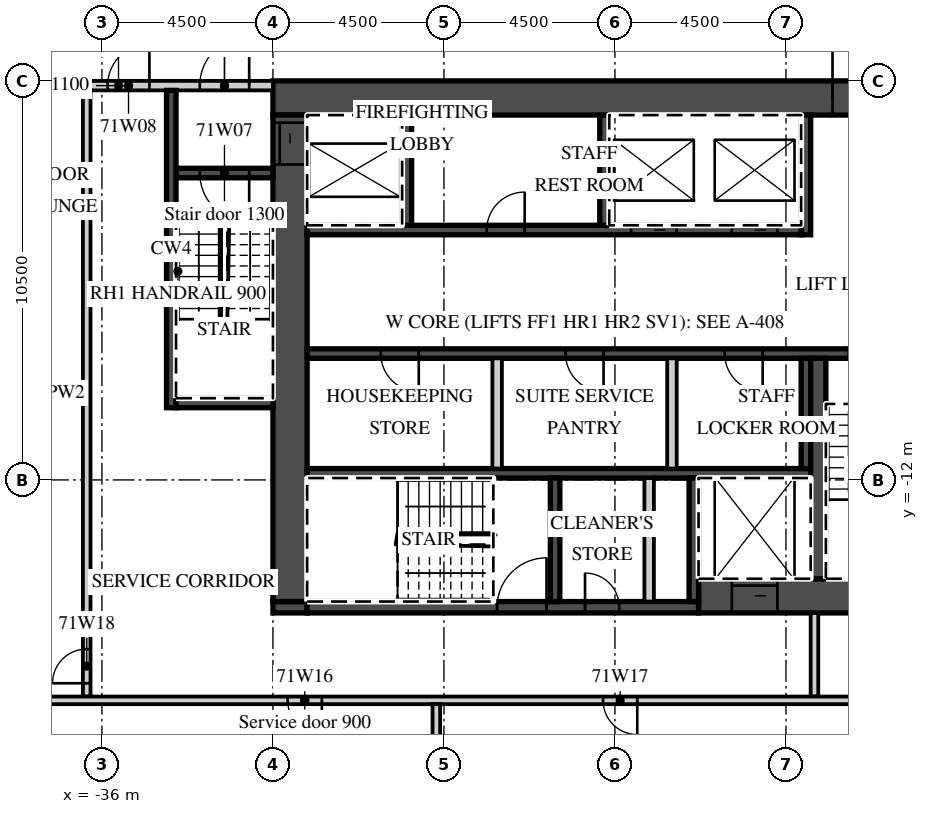
"""IFC4 building model, lengths in metres.
Left out: names, types, materials, properties, quantities, classifications, styles, units other than length and angle.
Written with IfcOpenShell. Run it as: python <this file> out.ifc"""

import sys

from ifc_helpers import new_model, si_unit, direction, frame, frame_2d, origin, place, context, subcontext, project, spatial, rectangle, extrude, element, fill, save


model = new_model("IFC4")
c1 = context("Model", 3, precision=1e-05, world=origin(), true_north=direction((0.0, 1.0)))
c2 = subcontext(c1, "Body", "Model", "MODEL_VIEW")
j1 = project(units=[si_unit("LENGTHUNIT", "METRE"), si_unit("PLANEANGLEUNIT", "RADIAN")], contexts=[c1])
p1 = place(None, origin())
s1 = spatial("IfcSite", under=j1, at=p1, CompositionType="ELEMENT")
p2 = place(p1, origin())
s2 = spatial("IfcBuilding", under=s1, at=p2, CompositionType="ELEMENT")
p3 = place(p2, frame((0.0, 0.0, 285.0)))
s3 = spatial("IfcBuildingStorey", under=s2, at=p3, CompositionType="ELEMENT", Elevation=285.0)
p4 = place(p3, frame((-31.5, -1.95, 0.0), z_axis=(0.0, 0.0, 1.0), x_axis=(1.0, 0.0, 0.0)))
e1 = element("IfcWall", 1, at=p4, inside=s3, PredefinedType="SHEAR", context=c2, shape_type="SweptSolid", body=[
    extrude(rectangle(XDim=18.0, YDim=0.9, at=frame_2d((9.0, 0.0))), origin(), (0.0, 0.0, 1.0), 3.02),
])
p5 = place(p4, frame((14.725, 0.0, 0.0)))
e2 = element("IfcOpeningElement", 2, at=p5, cuts=e1, PredefinedType="OPENING", context=c2, shape_type="SweptSolid", body=[
    extrude(rectangle(XDim=1.8, YDim=2.1, at=frame_2d((0.9, 1.05))), frame((0.0, 0.46, 0.0), z_axis=(0.0, -1.0, 0.0), x_axis=(1.0, 0.0, 0.0)), (0.0, 0.0, 1.0), 0.92),
])
p6 = place(p3, frame((-20.3, -15.05, 0.0), z_axis=(0.0, 0.0, 1.0), x_axis=(1.0, 0.0, 0.0)))
e3 = element("IfcWall", 3, at=p6, inside=s3, PredefinedType="SHEAR", context=c2, shape_type="SweptSolid", body=[
    extrude(rectangle(XDim=6.8, YDim=0.9, at=frame_2d((3.4, 0.0))), origin(), (0.0, 0.0, 1.0), 3.02),
])
p7 = place(p6, frame((0.875, 0.0, 0.0)))
e4 = element("IfcOpeningElement", 4, at=p7, cuts=e3, PredefinedType="OPENING", context=c2, shape_type="SweptSolid", body=[
    extrude(rectangle(XDim=1.2, YDim=2.1, at=frame_2d((0.6, 1.05))), frame((0.0, 0.46, 0.0), z_axis=(0.0, -1.0, 0.0), x_axis=(1.0, 0.0, 0.0)), (0.0, 0.0, 1.0), 0.92),
])
p8 = place(p3, frame((-31.5, -15.35, 0.0), z_axis=(0.0, 0.0, 1.0), x_axis=(1.0, 0.0, 0.0)))
e5 = element("IfcWall", 5, at=p8, inside=s3, PredefinedType="SHEAR", context=c2, shape_type="SweptSolid", body=[
    extrude(rectangle(XDim=0.9, YDim=0.3, at=frame_2d((0.45, 0.0))), origin(), (0.0, 0.0, 1.0), 3.02),
])
p9 = place(p3, frame((-30.6, -15.35, 0.0), z_axis=(0.0, 0.0, 1.0), x_axis=(1.0, 0.0, 0.0)))
e6 = element("IfcWall", 6, at=p9, inside=s3, PredefinedType="SHEAR", context=c2, shape_type="SweptSolid", body=[
    extrude(rectangle(XDim=10.3, YDim=0.3, at=frame_2d((5.15, 0.0))), origin(), (0.0, 0.0, 1.0), 3.02),
])
p10 = place(p9, frame((5.0, 0.0, 0.0)))
e7 = element("IfcOpeningElement", 7, at=p10, cuts=e6, PredefinedType="OPENING", context=c2, shape_type="SweptSolid", body=[
    extrude(rectangle(XDim=1.3, YDim=2.1, at=frame_2d((0.65, 1.05))), frame((0.0, 0.16, 0.0), z_axis=(0.0, -1.0, 0.0), x_axis=(1.0, 0.0, 0.0)), (0.0, 0.0, 1.0), 0.32),
])
p11 = place(p9, frame((7.312, 0.0, 0.0)))
e8 = element("IfcOpeningElement", 8, at=p11, cuts=e6, PredefinedType="OPENING", context=c2, shape_type="SweptSolid", body=[
    extrude(rectangle(XDim=0.9, YDim=2.1, at=frame_2d((0.45, 1.05))), frame((0.0, 0.16, 0.0), z_axis=(0.0, -1.0, 0.0), x_axis=(1.0, 0.0, 0.0)), (0.0, 0.0, 1.0), 0.32),
])
p12 = place(p3, frame((-31.05, -15.2, 0.0), z_axis=(0.0, 0.0, 1.0), x_axis=(0.0, 1.0, 0.0)))
e9 = element("IfcWall", 9, at=p12, inside=s3, PredefinedType="SHEAR", context=c2, shape_type="SweptSolid", body=[
    extrude(rectangle(XDim=12.8, YDim=0.9, at=frame_2d((6.4, 0.0))), origin(), (0.0, 0.0, 1.0), 3.02),
])
p13 = place(p12, frame((11.5, 0.0, 0.0)))
e10 = element("IfcOpeningElement", 10, at=p13, cuts=e9, PredefinedType="OPENING", context=c2, shape_type="SweptSolid", body=[
    extrude(rectangle(XDim=1.1, YDim=2.1, at=frame_2d((0.55, 1.05))), frame((0.0, 0.46, 0.0), z_axis=(0.0, -1.0, 0.0), x_axis=(1.0, 0.0, 0.0)), (0.0, 0.0, 1.0), 0.92),
])
p14 = place(p3, frame((-30.6, -5.425, 0.0), z_axis=(0.0, 0.0, 1.0), x_axis=(1.0, 0.0, 0.0)))
e11 = element("IfcWall", 11, at=p14, inside=s3, PredefinedType="SHEAR", context=c2, shape_type="SweptSolid", body=[
    extrude(rectangle(XDim=13.0, YDim=0.25, at=frame_2d((6.5, 0.0))), origin(), (0.0, 0.0, 1.0), 3.02),
])
p15 = place(p14, frame((8.525, 0.0, 0.0)))
e12 = element("IfcOpeningElement", 12, at=p15, cuts=e11, PredefinedType="OPENING", context=c2, shape_type="SweptSolid", body=[
    extrude(rectangle(XDim=1.2, YDim=2.1, at=frame_2d((0.6, 1.05))), frame((0.0, 0.135, 0.0), z_axis=(0.0, -1.0, 0.0), x_axis=(1.0, 0.0, 0.0)), (0.0, 0.0, 1.0), 0.27),
])
p16 = place(p14, frame((11.175, 0.0, 0.0)))
e13 = element("IfcOpeningElement", 13, at=p16, cuts=e11, PredefinedType="OPENING", context=c2, shape_type="SweptSolid", body=[
    extrude(rectangle(XDim=1.2, YDim=2.1, at=frame_2d((0.6, 1.05))), frame((0.0, 0.135, 0.0), z_axis=(0.0, -1.0, 0.0), x_axis=(1.0, 0.0, 0.0)), (0.0, 0.0, 1.0), 0.27),
])
p17 = place(p14, frame((4.725, 0.0, 0.0)))
e14 = element("IfcOpeningElement", 14, at=p17, cuts=e11, PredefinedType="OPENING", context=c2, shape_type="SweptSolid", body=[
    extrude(rectangle(XDim=1.0, YDim=2.1, at=frame_2d((0.5, 1.05))), frame((0.0, 0.135, 0.0), z_axis=(0.0, -1.0, 0.0), x_axis=(1.0, 0.0, 0.0)), (0.0, 0.0, 1.0), 0.27),
])
p18 = place(p3, frame((-17.475, -5.55, 0.0), z_axis=(0.0, 0.0, 1.0), x_axis=(0.0, 1.0, 0.0)))
e15 = element("IfcWall", 15, at=p18, inside=s3, PredefinedType="SHEAR", context=c2, shape_type="SweptSolid", body=[
    extrude(rectangle(XDim=3.15, YDim=0.25, at=frame_2d((1.575, 0.0))), origin(), (0.0, 0.0, 1.0), 3.02),
])
for number, where, z_axis, x_axis in (
    (16, (-27.975, -5.3, 0.0), (0.0, 0.0, 1.0), (0.0, 1.0, 0.0)),
    (17, (-22.775, -5.3, 0.0), (0.0, 0.0, 1.0), (0.0, 1.0, 0.0)),
):
    element("IfcWall", number, at=place(p3, frame(where, z_axis=z_axis, x_axis=x_axis)), inside=s3, PredefinedType="SHEAR", context=c2, shape_type="SweptSolid", body=[
        extrude(rectangle(XDim=2.9, YDim=0.25, at=frame_2d((1.45, 0.0))), origin(), (0.0, 0.0, 1.0), 3.02),
    ])
p19 = place(p3, frame((-30.6, -8.675, 0.0), z_axis=(0.0, 0.0, 1.0), x_axis=(1.0, 0.0, 0.0)))
e18 = element("IfcWall", 18, at=p19, inside=s3, PredefinedType="SHEAR", context=c2, shape_type="SweptSolid", body=[
    extrude(rectangle(XDim=16.2, YDim=0.25, at=frame_2d((8.1, 0.0))), origin(), (0.0, 0.0, 1.0), 3.02),
])
p20 = place(p19, frame((14.25, 0.0, 0.0)))
e19 = element("IfcOpeningElement", 19, at=p20, cuts=e18, PredefinedType="OPENING", context=c2, shape_type="SweptSolid", body=[
    extrude(rectangle(XDim=1.3, YDim=2.1, at=frame_2d((0.65, 1.05))), frame((0.0, 0.135, 0.0), z_axis=(0.0, -1.0, 0.0), x_axis=(1.0, 0.0, 0.0)), (0.0, 0.0, 1.0), 0.27),
])
p21 = place(p19, frame((1.938, 0.0, 0.0)))
e20 = element("IfcOpeningElement", 20, at=p21, cuts=e18, PredefinedType="OPENING", context=c2, shape_type="SweptSolid", body=[
    extrude(rectangle(XDim=1.0, YDim=2.1, at=frame_2d((0.5, 1.05))), frame((0.0, 0.135, 0.0), z_axis=(0.0, -1.0, 0.0), x_axis=(1.0, 0.0, 0.0)), (0.0, 0.0, 1.0), 0.27),
])
p22 = place(p19, frame((6.8, 0.0, 0.0)))
e21 = element("IfcOpeningElement", 21, at=p22, cuts=e18, PredefinedType="OPENING", context=c2, shape_type="SweptSolid", body=[
    extrude(rectangle(XDim=1.0, YDim=2.1, at=frame_2d((0.5, 1.05))), frame((0.0, 0.135, 0.0), z_axis=(0.0, -1.0, 0.0), x_axis=(1.0, 0.0, 0.0)), (0.0, 0.0, 1.0), 0.27),
])
p23 = place(p19, frame((10.988, 0.0, 0.0)))
e22 = element("IfcOpeningElement", 22, at=p23, cuts=e18, PredefinedType="OPENING", context=c2, shape_type="SweptSolid", body=[
    extrude(rectangle(XDim=1.0, YDim=2.1, at=frame_2d((0.5, 1.05))), frame((0.0, 0.135, 0.0), z_axis=(0.0, -1.0, 0.0), x_axis=(1.0, 0.0, 0.0)), (0.0, 0.0, 1.0), 0.27),
])
p24 = place(p3, frame((-30.6, -11.825, 0.0), z_axis=(0.0, 0.0, 1.0), x_axis=(1.0, 0.0, 0.0)))
e23 = element("IfcWall", 23, at=p24, inside=s3, PredefinedType="SHEAR", context=c2, shape_type="SweptSolid", body=[
    extrude(rectangle(XDim=13.25, YDim=0.25, at=frame_2d((6.625, 0.0))), origin(), (0.0, 0.0, 1.0), 3.02),
])
p25 = place(p3, frame((-17.475, -11.7, 0.0), z_axis=(0.0, 0.0, 1.0), x_axis=(0.0, 1.0, 0.0)))
e24 = element("IfcWall", 24, at=p25, inside=s3, PredefinedType="SHEAR", context=c2, shape_type="SweptSolid", body=[
    extrude(rectangle(XDim=2.9, YDim=0.25, at=frame_2d((1.45, 0.0))), origin(), (0.0, 0.0, 1.0), 3.02),
])
for number, where, z_axis, x_axis in (
    (25, (-25.6, -11.7, 0.0), (0.0, 0.0, 1.0), (0.0, 1.0, 0.0)),
    (26, (-21.0, -11.7, 0.0), (0.0, 0.0, 1.0), (0.0, 1.0, 0.0)),
):
    element("IfcWall", number, at=place(p3, frame(where, z_axis=z_axis, x_axis=x_axis)), inside=s3, PredefinedType="PARTITIONING", context=c2, shape_type="SweptSolid", body=[
        extrude(rectangle(XDim=2.9, YDim=0.25, at=frame_2d((1.45, 0.0))), origin(), (0.0, 0.0, 1.0), 3.02),
    ])
p26 = place(p3, frame((-17.15, -14.6, 0.0), z_axis=(0.0, 0.0, 1.0), x_axis=(0.0, 1.0, 0.0)))
e27 = element("IfcWall", 27, at=p26, inside=s3, PredefinedType="SHEAR", context=c2, shape_type="SweptSolid", body=[
    extrude(rectangle(XDim=5.8, YDim=0.4, at=frame_2d((2.9, 0.0))), origin(), (0.0, 0.0, 1.0), 3.02),
])
for number, where, z_axis, x_axis in (
    (28, (-20.425, -15.2, 0.0), (0.0, 0.0, 1.0), (0.0, 1.0, 0.0)),
    (29, (-24.075, -15.2, 0.0), (0.0, 0.0, 1.0), (0.0, 1.0, 0.0)),
):
    element("IfcWall", number, at=place(p3, frame(where, z_axis=z_axis, x_axis=x_axis)), inside=s3, PredefinedType="SHEAR", context=c2, shape_type="SweptSolid", body=[
        extrude(rectangle(XDim=3.25, YDim=0.25, at=frame_2d((1.625, 0.0))), origin(), (0.0, 0.0, 1.0), 3.02),
    ])
p27 = place(p3, frame((-21.6, -15.2, 0.0), z_axis=(0.0, 0.0, 1.0), x_axis=(0.0, 1.0, 0.0)))
e30 = element("IfcWall", 30, at=p27, inside=s3, PredefinedType="PARTITIONING", context=c2, shape_type="SweptSolid", body=[
    extrude(rectangle(XDim=3.25, YDim=0.25, at=frame_2d((1.625, 0.0))), origin(), (0.0, 0.0, 1.0), 3.02),
])
p28 = place(p3, frame((-39.627, -1.625, 0.0), z_axis=(0.0, 0.0, 1.0), x_axis=(1.0, 0.0, 0.0)))
e31 = element("IfcWall", 31, at=p28, inside=s3, PredefinedType="PARTITIONING", context=c2, shape_type="SweptSolid", body=[
    extrude(rectangle(XDim=8.127, YDim=0.25, at=frame_2d((4.063, 0.0))), origin(), (0.0, 0.0, 1.0), 3.02),
])
p29 = place(p28, frame((6.202, 0.0, 0.0)))
e32 = element("IfcOpeningElement", 32, at=p29, cuts=e31, PredefinedType="OPENING", context=c2, shape_type="SweptSolid", body=[
    extrude(rectangle(XDim=1.3, YDim=2.1, at=frame_2d((0.65, 1.05))), frame((0.0, 0.135, 0.0), z_axis=(0.0, -1.0, 0.0), x_axis=(1.0, 0.0, 0.0)), (0.0, 0.0, 1.0), 0.27),
])
p30 = place(p28, frame((3.777, 0.0, 0.0)))
e33 = element("IfcOpeningElement", 33, at=p30, cuts=e31, PredefinedType="OPENING", context=c2, shape_type="SweptSolid", body=[
    extrude(rectangle(XDim=1.1, YDim=2.1, at=frame_2d((0.55, 1.05))), frame((0.0, 0.135, 0.0), z_axis=(0.0, -1.0, 0.0), x_axis=(1.0, 0.0, 0.0)), (0.0, 0.0, 1.0), 0.27),
])
p31 = place(p3, frame((-34.05, -3.925, 0.0), z_axis=(0.0, 0.0, 1.0), x_axis=(1.0, 0.0, 0.0)))
e34 = element("IfcWall", 34, at=p31, inside=s3, PredefinedType="SHEAR", context=c2, shape_type="SweptSolid", body=[
    extrude(rectangle(XDim=2.55, YDim=0.25, at=frame_2d((1.275, 0.0))), origin(), (0.0, 0.0, 1.0), 3.02),
])
p32 = place(p31, frame((0.625, 0.0, 0.0)))
e35 = element("IfcOpeningElement", 35, at=p32, cuts=e34, PredefinedType="OPENING", context=c2, shape_type="SweptSolid", body=[
    extrude(rectangle(XDim=1.3, YDim=2.1, at=frame_2d((0.65, 1.05))), frame((0.0, 0.135, 0.0), z_axis=(0.0, -1.0, 0.0), x_axis=(1.0, 0.0, 0.0)), (0.0, 0.0, 1.0), 0.27),
])
p33 = place(p3, frame((-34.175, -10.1, 0.0), z_axis=(0.0, 0.0, 1.0), x_axis=(0.0, 1.0, 0.0)))
e36 = element("IfcWall", 36, at=p33, inside=s3, PredefinedType="SHEAR", context=c2, shape_type="SweptSolid", body=[
    extrude(rectangle(XDim=8.35, YDim=0.25, at=frame_2d((4.175, 0.0))), origin(), (0.0, 0.0, 1.0), 3.02),
])
p34 = place(p3, frame((-34.05, -9.975, 0.0), z_axis=(0.0, 0.0, 1.0), x_axis=(1.0, 0.0, 0.0)))
e37 = element("IfcWall", 37, at=p34, inside=s3, PredefinedType="SHEAR", context=c2, shape_type="SweptSolid", body=[
    extrude(rectangle(XDim=2.55, YDim=0.25, at=frame_2d((1.275, 0.0))), origin(), (0.0, 0.0, 1.0), 3.02),
])
p35 = place(p3, frame((-17.25, -17.7, 0.0), z_axis=(0.0, 0.0, 1.0), x_axis=(0.0, 1.0, 0.0)))
e38 = element("IfcWall", 38, at=p35, inside=s3, PredefinedType="PARTITIONING", context=c2, shape_type="SweptSolid", body=[
    extrude(rectangle(XDim=2.2, YDim=0.2, at=frame_2d((1.1, 0.0))), origin(), (0.0, 0.0, 1.0), 3.02),
])
p36 = place(p3, frame((-36.4, -17.7, 0.0), z_axis=(0.0, 0.0, 1.0), x_axis=(0.0, 1.0, 0.0)))
e39 = element("IfcWall", 39, at=p36, inside=s3, PredefinedType="PARTITIONING", context=c2, shape_type="SweptSolid", body=[
    extrude(rectangle(XDim=15.95, YDim=0.2, at=frame_2d((7.975, 0.0))), origin(), (0.0, 0.0, 1.0), 3.02),
])
p37 = place(p36, frame((0.35, 0.0, 0.0)))
e40 = element("IfcOpeningElement", 40, at=p37, cuts=e39, PredefinedType="OPENING", context=c2, shape_type="SweptSolid", body=[
    extrude(rectangle(XDim=0.9, YDim=2.1, at=frame_2d((0.45, 1.05))), frame((0.0, 0.11, 0.0), z_axis=(0.0, -1.0, 0.0), x_axis=(1.0, 0.0, 0.0)), (0.0, 0.0, 1.0), 0.22),
])
p38 = place(p3, frame((-38.07, -17.8, 0.0), z_axis=(0.0, 0.0, 1.0), x_axis=(1.0, 0.0, 0.0)))
e41 = element("IfcWall", 41, at=p38, inside=s3, PredefinedType="PARTITIONING", context=c2, shape_type="SweptSolid", body=[
    extrude(rectangle(XDim=24.47, YDim=0.2, at=frame_2d((12.235, 0.0))), origin(), (0.0, 0.0, 1.0), 3.02),
])
p39 = place(p38, frame((6.957, 0.0, 0.0)))
e42 = element("IfcOpeningElement", 42, at=p39, cuts=e41, PredefinedType="OPENING", context=c2, shape_type="SweptSolid", body=[
    extrude(rectangle(XDim=0.9, YDim=2.1, at=frame_2d((0.45, 1.05))), frame((0.0, 0.11, 0.0), z_axis=(0.0, -1.0, 0.0), x_axis=(1.0, 0.0, 0.0)), (0.0, 0.0, 1.0), 0.22),
])
p40 = place(p38, frame((15.257, 0.0, 0.0)))
e43 = element("IfcOpeningElement", 43, at=p40, cuts=e41, PredefinedType="OPENING", context=c2, shape_type="SweptSolid", body=[
    extrude(rectangle(XDim=0.9, YDim=2.1, at=frame_2d((0.45, 1.05))), frame((0.0, 0.11, 0.0), z_axis=(0.0, -1.0, 0.0), x_axis=(1.0, 0.0, 0.0)), (0.0, 0.0, 1.0), 0.22),
])
p41 = place(p3, frame((-27.2, -22.716, 0.0), z_axis=(0.0, 0.0, 1.0), x_axis=(0.0, 1.0, 0.0)))
e44 = element("IfcWall", 44, at=p41, inside=s3, PredefinedType="PARTITIONING", context=c2, shape_type="SweptSolid", body=[
    extrude(rectangle(XDim=4.816, YDim=0.2, at=frame_2d((2.408, 0.0))), origin(), (0.0, 0.0, 1.0), 3.02),
])
p42 = place(p15, origin())
e45 = element("IfcDoor", 45, at=p42, inside=s3, OperationType="SLIDING_TO_LEFT", PredefinedType="DOOR", context=c2, shape_type="SweptSolid", body=[
    extrude(rectangle(XDim=1.2, YDim=2.1, at=frame_2d((0.6, 1.05))), frame((0.0, 0.025, 0.0), z_axis=(0.0, -1.0, 0.0), x_axis=(1.0, 0.0, 0.0)), (0.0, 0.0, 1.0), 0.05),
])
fill(e12, e45)
p43 = place(p16, origin())
e46 = element("IfcDoor", 46, at=p43, inside=s3, OperationType="SLIDING_TO_RIGHT", PredefinedType="DOOR", context=c2, shape_type="SweptSolid", body=[
    extrude(rectangle(XDim=1.2, YDim=2.1, at=frame_2d((0.6, 1.05))), frame((0.0, 0.025, 0.0), z_axis=(0.0, -1.0, 0.0), x_axis=(1.0, 0.0, 0.0)), (0.0, 0.0, 1.0), 0.05),
])
fill(e13, e46)
p44 = place(p7, origin())
e47 = element("IfcDoor", 47, at=p44, inside=s3, OperationType="SLIDING_TO_LEFT", PredefinedType="DOOR", context=c2, shape_type="SweptSolid", body=[
    extrude(rectangle(XDim=1.2, YDim=2.1, at=frame_2d((0.6, 1.05))), frame((0.0, 0.025, 0.0), z_axis=(0.0, -1.0, 0.0), x_axis=(1.0, 0.0, 0.0)), (0.0, 0.0, 1.0), 0.05),
])
fill(e4, e47)
p45 = place(p13, origin())
e48 = element("IfcDoor", 48, at=p45, inside=s3, OperationType="SLIDING_TO_RIGHT", PredefinedType="DOOR", context=c2, shape_type="SweptSolid", body=[
    extrude(rectangle(XDim=1.1, YDim=2.1, at=frame_2d((0.55, 1.05))), frame((0.0, 0.025, 0.0), z_axis=(0.0, -1.0, 0.0), x_axis=(1.0, 0.0, 0.0)), (0.0, 0.0, 1.0), 0.05),
])
fill(e10, e48)
p46 = place(p5, origin())
e49 = element("IfcDoor", 49, at=p46, inside=s3, OperationType="DOUBLE_DOOR_DOUBLE_SWING", PredefinedType="DOOR", context=c2, shape_type="SweptSolid", body=[
    extrude(rectangle(XDim=1.8, YDim=2.1, at=frame_2d((0.9, 1.05))), frame((0.0, 0.025, 0.0), z_axis=(0.0, -1.0, 0.0), x_axis=(1.0, 0.0, 0.0)), (0.0, 0.0, 1.0), 0.05),
])
fill(e2, e49)
p47 = place(p29, origin())
e50 = element("IfcDoor", 50, at=p47, inside=s3, OperationType="SINGLE_SWING_RIGHT", PredefinedType="DOOR", context=c2, shape_type="SweptSolid", body=[
    extrude(rectangle(XDim=1.3, YDim=2.1, at=frame_2d((0.65, 1.05))), frame((0.0, 0.025, 0.0), z_axis=(0.0, -1.0, 0.0), x_axis=(1.0, 0.0, 0.0)), (0.0, 0.0, 1.0), 0.05),
])
fill(e32, e50)
p48 = place(p32, origin())
e51 = element("IfcDoor", 51, at=p48, inside=s3, OperationType="SINGLE_SWING_RIGHT", PredefinedType="DOOR", context=c2, shape_type="SweptSolid", body=[
    extrude(rectangle(XDim=1.3, YDim=2.1, at=frame_2d((0.65, 1.05))), frame((0.0, 0.025, 0.0), z_axis=(0.0, -1.0, 0.0), x_axis=(1.0, 0.0, 0.0)), (0.0, 0.0, 1.0), 0.05),
])
fill(e35, e51)
p49 = place(p30, origin())
e52 = element("IfcDoor", 52, at=p49, inside=s3, OperationType="SINGLE_SWING_RIGHT", PredefinedType="DOOR", context=c2, shape_type="SweptSolid", body=[
    extrude(rectangle(XDim=1.1, YDim=2.1, at=frame_2d((0.55, 1.05))), frame((0.0, 0.025, 0.0), z_axis=(0.0, -1.0, 0.0), x_axis=(1.0, 0.0, 0.0)), (0.0, 0.0, 1.0), 0.05),
])
fill(e33, e52)
p50 = place(p20, origin())
e53 = element("IfcDoor", 53, at=p50, inside=s3, OperationType="SINGLE_SWING_RIGHT", PredefinedType="DOOR", context=c2, shape_type="SweptSolid", body=[
    extrude(rectangle(XDim=1.3, YDim=2.1, at=frame_2d((0.65, 1.05))), frame((0.0, 0.025, 0.0), z_axis=(0.0, -1.0, 0.0), x_axis=(1.0, 0.0, 0.0)), (0.0, 0.0, 1.0), 0.05),
])
fill(e19, e53)
p51 = place(p10, origin())
e54 = element("IfcDoor", 54, at=p51, inside=s3, OperationType="SINGLE_SWING_RIGHT", PredefinedType="DOOR", context=c2, shape_type="SweptSolid", body=[
    extrude(rectangle(XDim=1.3, YDim=2.1, at=frame_2d((0.65, 1.05))), frame((0.0, 0.025, 0.0), z_axis=(0.0, -1.0, 0.0), x_axis=(1.0, 0.0, 0.0)), (0.0, 0.0, 1.0), 0.05),
])
fill(e7, e54)
p52 = place(p11, origin())
e55 = element("IfcDoor", 55, at=p52, inside=s3, OperationType="SINGLE_SWING_LEFT", PredefinedType="DOOR", context=c2, shape_type="SweptSolid", body=[
    extrude(rectangle(XDim=0.9, YDim=2.1, at=frame_2d((0.45, 1.05))), frame((0.0, 0.025, 0.0), z_axis=(0.0, -1.0, 0.0), x_axis=(1.0, 0.0, 0.0)), (0.0, 0.0, 1.0), 0.05),
])
fill(e8, e55)
p53 = place(p21, origin())
e56 = element("IfcDoor", 56, at=p53, inside=s3, OperationType="SINGLE_SWING_RIGHT", PredefinedType="DOOR", context=c2, shape_type="SweptSolid", body=[
    extrude(rectangle(XDim=1.0, YDim=2.1, at=frame_2d((0.5, 1.05))), frame((0.0, 0.025, 0.0), z_axis=(0.0, -1.0, 0.0), x_axis=(1.0, 0.0, 0.0)), (0.0, 0.0, 1.0), 0.05),
])
fill(e20, e56)
p54 = place(p22, origin())
e57 = element("IfcDoor", 57, at=p54, inside=s3, OperationType="SINGLE_SWING_RIGHT", PredefinedType="DOOR", context=c2, shape_type="SweptSolid", body=[
    extrude(rectangle(XDim=1.0, YDim=2.1, at=frame_2d((0.5, 1.05))), frame((0.0, 0.025, 0.0), z_axis=(0.0, -1.0, 0.0), x_axis=(1.0, 0.0, 0.0)), (0.0, 0.0, 1.0), 0.05),
])
fill(e21, e57)
p55 = place(p23, origin())
e58 = element("IfcDoor", 58, at=p55, inside=s3, OperationType="SINGLE_SWING_RIGHT", PredefinedType="DOOR", context=c2, shape_type="SweptSolid", body=[
    extrude(rectangle(XDim=1.0, YDim=2.1, at=frame_2d((0.5, 1.05))), frame((0.0, 0.025, 0.0), z_axis=(0.0, -1.0, 0.0), x_axis=(1.0, 0.0, 0.0)), (0.0, 0.0, 1.0), 0.05),
])
fill(e22, e58)
p56 = place(p17, origin())
e59 = element("IfcDoor", 59, at=p56, inside=s3, OperationType="SINGLE_SWING_RIGHT", PredefinedType="DOOR", context=c2, shape_type="SweptSolid", body=[
    extrude(rectangle(XDim=1.0, YDim=2.1, at=frame_2d((0.5, 1.05))), frame((0.0, 0.025, 0.0), z_axis=(0.0, -1.0, 0.0), x_axis=(1.0, 0.0, 0.0)), (0.0, 0.0, 1.0), 0.05),
])
fill(e14, e59)
p57 = place(p39, origin())
e60 = element("IfcDoor", 60, at=p57, inside=s3, OperationType="SINGLE_SWING_RIGHT", PredefinedType="DOOR", context=c2, shape_type="SweptSolid", body=[
    extrude(rectangle(XDim=0.9, YDim=2.1, at=frame_2d((0.45, 1.05))), frame((0.0, 0.025, 0.0), z_axis=(0.0, -1.0, 0.0), x_axis=(1.0, 0.0, 0.0)), (0.0, 0.0, 1.0), 0.05),
])
fill(e42, e60)
p58 = place(p40, origin())
e61 = element("IfcDoor", 61, at=p58, inside=s3, OperationType="SINGLE_SWING_RIGHT", PredefinedType="DOOR", context=c2, shape_type="SweptSolid", body=[
    extrude(rectangle(XDim=0.9, YDim=2.1, at=frame_2d((0.45, 1.05))), frame((0.0, 0.025, 0.0), z_axis=(0.0, -1.0, 0.0), x_axis=(1.0, 0.0, 0.0)), (0.0, 0.0, 1.0), 0.05),
])
fill(e43, e61)
p59 = place(p37, origin())
e62 = element("IfcDoor", 62, at=p59, inside=s3, OperationType="SINGLE_SWING_LEFT", PredefinedType="DOOR", context=c2, shape_type="SweptSolid", body=[
    extrude(rectangle(XDim=0.9, YDim=2.1, at=frame_2d((0.45, 1.05))), frame((0.0, 0.025, 0.0), z_axis=(0.0, -1.0, 0.0), x_axis=(1.0, 0.0, 0.0)), (0.0, 0.0, 1.0), 0.05),
])
fill(e40, e62)
save(model, sys.argv[1])
